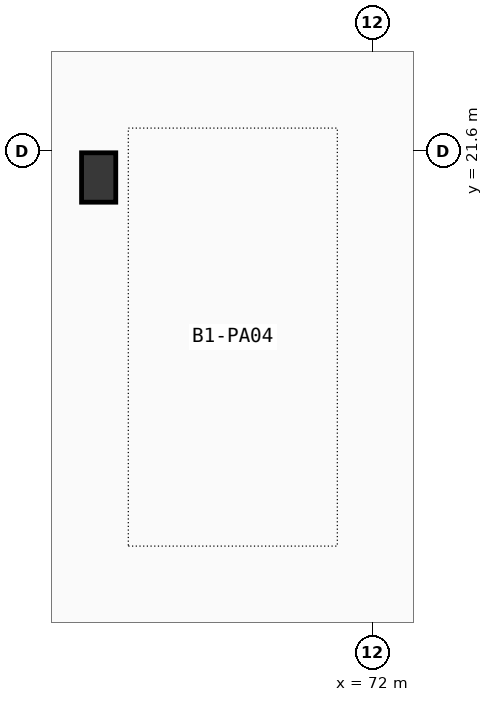
"""IFC4 building model, lengths in metres.
Left out: names, types, materials, properties, quantities, classifications, styles, units other than length and angle.
Written with IfcOpenShell. Run it as: python <this file> out.ifc"""

import sys

from ifc_helpers import new_model, si_unit, direction, frame, origin, origin_2d, place, context, subcontext, project, spatial, rectangle, extrude, element, save


model = new_model("IFC4")
c1 = context("Model", 3, precision=1e-05, world=origin(), true_north=direction((0.0, 1.0)))
c2 = subcontext(c1, "Body", "Model", "MODEL_VIEW")
j1 = project(units=[si_unit("LENGTHUNIT", "METRE"), si_unit("PLANEANGLEUNIT", "RADIAN")], contexts=[c1])
p1 = place(None, origin())
s1 = spatial("IfcSite", under=j1, at=p1, CompositionType="ELEMENT")
p2 = place(p1, origin())
s2 = spatial("IfcBuilding", under=s1, at=p2, CompositionType="ELEMENT")
p3 = place(p2, frame((0.0, 0.0, -4.2)))
s3 = spatial("IfcBuildingStorey", under=s2, at=p3, CompositionType="ELEMENT", Elevation=-4.2)
p4 = place(p3, frame((68.4, 21.25, 0.0), z_axis=(0.0, 0.0, 1.0), x_axis=(1.0, 0.0, 0.0)))
e1 = element("IfcColumn", 1, at=p4, inside=s3, PredefinedType="PILASTER", context=c2, shape_type="SweptSolid", body=[
    extrude(rectangle(XDim=0.45, YDim=0.65, at=origin_2d()), origin(), (0.0, 0.0, 1.0), 4.2),
])
save(model, sys.argv[1])
